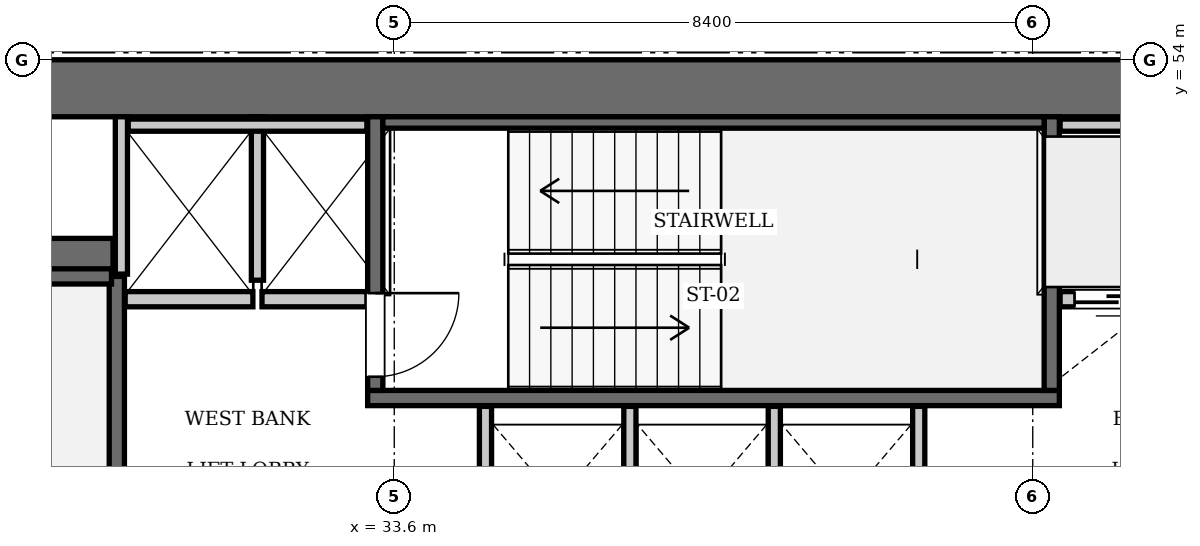
"""IFC4 building model, lengths in metres.
Left out: names, types, materials, properties, quantities, classifications, styles, units other than length and angle.
Written with IfcOpenShell. Run it as: python <this file> out.ifc"""

import sys

from ifc_helpers import new_model, si_unit, direction, frame, frame_2d, origin, place, context, subcontext, project, spatial, rectangle, extrude, element, fill, save


model = new_model("IFC4")
c1 = context("Model", 3, precision=1e-05, world=origin(), true_north=direction((0.0, 1.0)))
c2 = subcontext(c1, "Body", "Model", "MODEL_VIEW")
j1 = project(units=[si_unit("LENGTHUNIT", "METRE"), si_unit("PLANEANGLEUNIT", "RADIAN")], contexts=[c1])
p1 = place(None, origin())
s1 = spatial("IfcSite", under=j1, at=p1, CompositionType="ELEMENT")
p2 = place(p1, origin())
s2 = spatial("IfcBuilding", under=s1, at=p2, CompositionType="ELEMENT")
p3 = place(p2, frame((0.0, 0.0, 127.4)))
s3 = spatial("IfcBuildingStorey", under=s2, at=p3, CompositionType="ELEMENT", Elevation=127.4)
p4 = place(p3, frame((25.2, 53.625, 0.0), z_axis=(0.0, 0.0, 1.0), x_axis=(1.0, 0.0, 0.0)))
e1 = element("IfcWall", 1, at=p4, inside=s3, PredefinedType="SHEAR", context=c2, shape_type="SweptSolid", body=[
    extrude(rectangle(XDim=25.2, YDim=0.75, at=frame_2d((12.6, 0.0))), origin(), (0.0, 0.0, 1.0), 3.85),
])
p5 = place(p3, frame((25.95, 51.4, 0.0), z_axis=(0.0, 0.0, 1.0), x_axis=(1.0, 0.0, 0.0)))
e2 = element("IfcWall", 2, at=p5, inside=s3, PredefinedType="SHEAR", context=c2, shape_type="SweptSolid", body=[
    extrude(rectangle(XDim=3.95, YDim=0.5, at=frame_2d((1.975, 0.0))), origin(), (0.0, 0.0, 1.0), 3.85),
])
p6 = place(p3, frame((29.95, 42.15, 0.0), z_axis=(0.0, 0.0, 1.0), x_axis=(0.0, 1.0, 0.0)))
e3 = element("IfcWall", 3, at=p6, inside=s3, PredefinedType="SOLIDWALL", context=c2, shape_type="SweptSolid", body=[
    extrude(rectangle(XDim=9.0, YDim=0.2, at=frame_2d((4.5, 0.0))), origin(), (0.0, 0.0, 1.0), 3.61),
])
p7 = place(p3, frame((26.38, 51.15, 0.0), z_axis=(0.0, 0.0, 1.0), x_axis=(1.0, 0.0, 0.0)))
e4 = element("IfcWall", 4, at=p7, inside=s3, PredefinedType="SOLIDWALL", context=c2, shape_type="SweptSolid", body=[
    extrude(rectangle(XDim=3.5, YDim=0.2, at=frame_2d((1.75, 0.0))), origin(), (0.0, 0.0, 1.0), 3.61),
])
p8 = place(p3, frame((33.25, 49.55, 0.0), z_axis=(0.0, 0.0, 1.0), x_axis=(1.0, 0.0, 0.0)))
e5 = element("IfcWall", 5, at=p8, inside=s3, PredefinedType="SOLIDWALL", context=c2, shape_type="SweptSolid", body=[
    extrude(rectangle(XDim=9.1, YDim=0.2, at=frame_2d((4.55, 0.0))), origin(), (0.0, 0.0, 1.0), 3.61),
])
p9 = place(p3, frame((42.25, 49.65, 0.0), z_axis=(0.0, 0.0, 1.0), x_axis=(0.0, 1.0, 0.0)))
e6 = element("IfcWall", 6, at=p9, inside=s3, PredefinedType="SOLIDWALL", context=c2, shape_type="SweptSolid", body=[
    extrude(rectangle(XDim=3.6, YDim=0.2, at=frame_2d((1.8, 0.0))), origin(), (0.0, 0.0, 1.0), 3.61),
])
p10 = place(p3, frame((33.35, 49.65, 0.0), z_axis=(0.0, 0.0, 1.0), x_axis=(0.0, 1.0, 0.0)))
e7 = element("IfcWall", 7, at=p10, inside=s3, PredefinedType="SOLIDWALL", context=c2, shape_type="SweptSolid", body=[
    extrude(rectangle(XDim=3.6, YDim=0.2, at=frame_2d((1.8, 0.0))), origin(), (0.0, 0.0, 1.0), 3.61),
])
p11 = place(p10, frame((0.18, 0.0, 0.0)))
e8 = element("IfcOpeningElement", 8, at=p11, cuts=e7, PredefinedType="OPENING", context=c2, shape_type="SweptSolid", body=[
    extrude(rectangle(XDim=1.1, YDim=2.15, at=frame_2d((0.55, 1.075))), frame((0.0, 0.11, 0.0), z_axis=(0.0, -1.0, 0.0), x_axis=(1.0, 0.0, 0.0)), (0.0, 0.0, 1.0), 0.22),
])
p12 = place(p3, frame((33.45, 53.175, 0.0), z_axis=(0.0, 0.0, 1.0), x_axis=(1.0, 0.0, 0.0)))
e9 = element("IfcWall", 9, at=p12, inside=s3, PredefinedType="SOLIDWALL", context=c2, shape_type="SweptSolid", body=[
    extrude(rectangle(XDim=8.7, YDim=0.15, at=frame_2d((4.35, 0.0))), origin(), (0.0, 0.0, 1.0), 3.61),
])
p13 = place(p3, frame((30.06, 50.85, 0.0), z_axis=(0.0, 0.0, 1.0), x_axis=(1.0, 0.0, 0.0)))
e10 = element("IfcWall", 10, at=p13, inside=s3, PredefinedType="SOLIDWALL", context=c2, shape_type="SweptSolid", body=[
    extrude(rectangle(XDim=1.68, YDim=0.2, at=frame_2d((0.84, 0.0))), origin(), (0.0, 0.0, 1.0), 3.61),
])
p14 = place(p3, frame((31.86, 50.85, 0.0), z_axis=(0.0, 0.0, 1.0), x_axis=(1.0, 0.0, 0.0)))
e11 = element("IfcWall", 11, at=p14, inside=s3, PredefinedType="SOLIDWALL", context=c2, shape_type="SweptSolid", body=[
    extrude(rectangle(XDim=1.38, YDim=0.2, at=frame_2d((0.69, 0.0))), origin(), (0.0, 0.0, 1.0), 3.61),
])
p15 = place(p3, frame((42.36, 50.85, 0.0), z_axis=(0.0, 0.0, 1.0), x_axis=(1.0, 0.0, 0.0)))
e12 = element("IfcWall", 12, at=p15, inside=s3, PredefinedType="SOLIDWALL", context=c2, shape_type="SweptSolid", body=[
    extrude(rectangle(XDim=1.38, YDim=0.2, at=frame_2d((0.69, 0.0))), origin(), (0.0, 0.0, 1.0), 3.61),
])
p16 = place(p15, frame((0.19, 0.0, 0.0)))
e13 = element("IfcOpeningElement", 13, at=p16, cuts=e12, PredefinedType="OPENING", context=c2, shape_type="SweptSolid", body=[
    extrude(rectangle(XDim=1.0, YDim=2.15, at=frame_2d((0.5, 1.075))), frame((0.0, 0.11, 0.0), z_axis=(0.0, -1.0, 0.0), x_axis=(1.0, 0.0, 0.0)), (0.0, 0.0, 1.0), 0.22),
])
p17 = place(p3, frame((30.01, 51.18, 0.0), z_axis=(0.0, 0.0, 1.0), x_axis=(0.0, 1.0, 0.0)))
e14 = element("IfcWall", 14, at=p17, inside=s3, PredefinedType="SOLIDWALL", context=c2, shape_type="SweptSolid", body=[
    extrude(rectangle(XDim=2.07, YDim=0.16, at=frame_2d((1.035, 0.0))), origin(), (0.0, 0.0, 1.0), 3.61),
])
p18 = place(p3, frame((31.8, 51.1, 0.0), z_axis=(0.0, 0.0, 1.0), x_axis=(0.0, 1.0, 0.0)))
e15 = element("IfcWall", 15, at=p18, inside=s3, PredefinedType="SOLIDWALL", context=c2, shape_type="SweptSolid", body=[
    extrude(rectangle(XDim=2.15, YDim=0.16, at=frame_2d((1.075, 0.0))), origin(), (0.0, 0.0, 1.0), 3.61),
])
for number, where, z_axis, x_axis in (
    (16, (30.1, 53.14, 0.0), (0.0, 0.0, 1.0), (1.0, 0.0, 0.0)),
    (17, (42.36, 53.14, 0.0), (0.0, 0.0, 1.0), (1.0, 0.0, 0.0)),
):
    element("IfcWall", number, at=place(p3, frame(where, z_axis=z_axis, x_axis=x_axis)), inside=s3, PredefinedType="SOLIDWALL", context=c2, shape_type="SweptSolid", body=[
        extrude(rectangle(XDim=3.14, YDim=0.16, at=frame_2d((1.57, 0.0))), origin(), (0.0, 0.0, 1.0), 3.61),
    ])
for number, where, z_axis, x_axis in (
    (18, (34.8, 47.25, 0.0), (0.0, 0.0, 1.0), (0.0, 1.0, 0.0)),
    (19, (36.7, 47.25, 0.0), (0.0, 0.0, 1.0), (0.0, 1.0, 0.0)),
    (20, (38.6, 47.25, 0.0), (0.0, 0.0, 1.0), (0.0, 1.0, 0.0)),
    (21, (40.5, 47.25, 0.0), (0.0, 0.0, 1.0), (0.0, 1.0, 0.0)),
):
    element("IfcWall", number, at=place(p3, frame(where, z_axis=z_axis, x_axis=x_axis)), inside=s3, PredefinedType="SOLIDWALL", context=c2, shape_type="SweptSolid", body=[
        extrude(rectangle(XDim=2.19, YDim=0.16, at=frame_2d((1.095, 0.0))), origin(), (0.0, 0.0, 1.0), 3.61),
    ])
p19 = place(p11, frame((1.1, 0.0, 0.0), z_axis=(0.0, 0.0, 1.0), x_axis=(-1.0, 0.0, 0.0)))
e22 = element("IfcDoor", 22, at=p19, inside=s3, OperationType="SINGLE_SWING_LEFT", PredefinedType="DOOR", context=c2, shape_type="SweptSolid", body=[
    extrude(rectangle(XDim=1.1, YDim=2.15, at=frame_2d((0.55, 1.075))), frame((0.0, 0.025, 0.0), z_axis=(0.0, -1.0, 0.0), x_axis=(1.0, 0.0, 0.0)), (0.0, 0.0, 1.0), 0.05),
])
fill(e8, e22)
p20 = place(p16, frame((1.0, 0.0, 0.0), z_axis=(0.0, 0.0, 1.0), x_axis=(-1.0, 0.0, 0.0)))
e23 = element("IfcDoor", 23, at=p20, inside=s3, OperationType="SLIDING_TO_LEFT", PredefinedType="DOOR", context=c2, shape_type="SweptSolid", body=[
    extrude(rectangle(XDim=1.0, YDim=2.15, at=frame_2d((0.5, 1.075))), frame((0.0, 0.025, 0.0), z_axis=(0.0, -1.0, 0.0), x_axis=(1.0, 0.0, 0.0)), (0.0, 0.0, 1.0), 0.05),
])
fill(e13, e23)
save(model, sys.argv[1])
